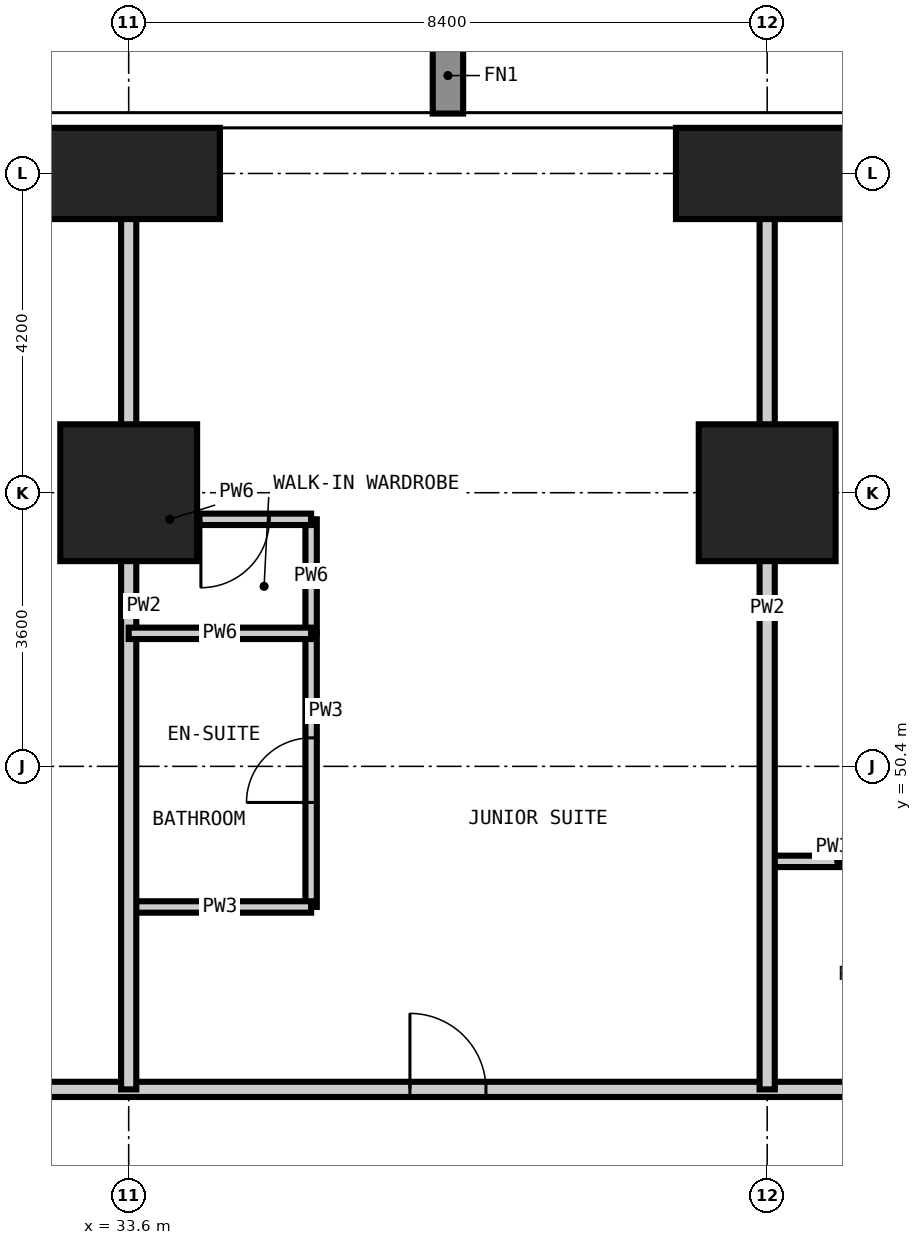
"""IFC4 building model, lengths in metres.
Left out: names, types, materials, properties, quantities, classifications, styles, units other than length and angle.
Written with IfcOpenShell. Run it as: python <this file> out.ifc"""

import sys

from ifc_helpers import new_model, si_unit, direction, frame, frame_2d, origin, origin_2d, place, context, subcontext, project, spatial, rectangle, extrude, element, fill, save


model = new_model("IFC4")
c1 = context("Model", 3, precision=1e-05, world=origin(), true_north=direction((0.0, 1.0)))
c2 = subcontext(c1, "Body", "Model", "MODEL_VIEW")
j1 = project(units=[si_unit("LENGTHUNIT", "METRE"), si_unit("PLANEANGLEUNIT", "RADIAN")], contexts=[c1])
p1 = place(None, origin())
s1 = spatial("IfcSite", under=j1, at=p1, CompositionType="ELEMENT")
p2 = place(p1, origin())
s2 = spatial("IfcBuilding", under=s1, at=p2, CompositionType="ELEMENT")
p3 = place(p2, frame((0.0, 0.0, 55.8)))
s3 = spatial("IfcBuildingStorey", under=s2, at=p3, CompositionType="ELEMENT", Elevation=55.8)
p4 = place(p3, frame((33.6, 54.0, -0.35), z_axis=(0.0, 0.0, 1.0), x_axis=(1.0, 0.0, 0.0)))
e1 = element("IfcColumn", 1, at=p4, inside=s3, PredefinedType="COLUMN", context=c2, shape_type="SweptSolid", body=[
    extrude(rectangle(XDim=1.8, YDim=1.8, at=origin_2d()), origin(), (0.0, 0.0, 1.0), 3.6),
])
p5 = place(p3, frame((33.6, 58.2, -0.35), z_axis=(0.0, 0.0, 1.0), x_axis=(1.0, 0.0, 0.0)))
e2 = element("IfcColumn", 2, at=p5, inside=s3, PredefinedType="COLUMN", context=c2, shape_type="SweptSolid", body=[
    extrude(rectangle(XDim=2.4, YDim=1.2, at=origin_2d()), origin(), (0.0, 0.0, 1.0), 3.6),
])
p6 = place(p3, frame((42.0, 54.0, -0.35), z_axis=(0.0, 0.0, 1.0), x_axis=(1.0, 0.0, 0.0)))
e3 = element("IfcColumn", 3, at=p6, inside=s3, PredefinedType="COLUMN", context=c2, shape_type="SweptSolid", body=[
    extrude(rectangle(XDim=1.8, YDim=1.8, at=origin_2d()), origin(), (0.0, 0.0, 1.0), 3.6),
])
p7 = place(p3, frame((42.0, 58.2, -0.35), z_axis=(0.0, 0.0, 1.0), x_axis=(1.0, 0.0, 0.0)))
e4 = element("IfcColumn", 4, at=p7, inside=s3, PredefinedType="COLUMN", context=c2, shape_type="SweptSolid", body=[
    extrude(rectangle(XDim=2.4, YDim=1.2, at=origin_2d()), origin(), (0.0, 0.0, 1.0), 3.6),
])
p8 = place(p3, frame((36.0, 48.55, 0.0), z_axis=(0.0, 0.0, 1.0), x_axis=(0.0, 1.0, 0.0)))
e5 = element("IfcWall", 5, at=p8, inside=s3, PredefinedType="PARTITIONING", context=c2, shape_type="SweptSolid", body=[
    extrude(rectangle(XDim=3.6, YDim=0.15, at=frame_2d((1.8, 0.0))), origin(), (0.0, 0.0, 1.0), 3.25),
])
p9 = place(p8, frame((1.375, 0.0, 0.0)))
e6 = element("IfcOpeningElement", 6, at=p9, cuts=e5, PredefinedType="OPENING", context=c2, shape_type="SweptSolid", body=[
    extrude(rectangle(XDim=0.85, YDim=2.1, at=frame_2d((0.425, 1.05))), frame((0.0, 0.085, 0.0), z_axis=(0.0, -1.0, 0.0), x_axis=(1.0, 0.0, 0.0)), (0.0, 0.0, 1.0), 0.17),
])
p10 = place(p3, frame((33.6, 48.55, 0.0), z_axis=(0.0, 0.0, 1.0), x_axis=(1.0, 0.0, 0.0)))
e7 = element("IfcWall", 7, at=p10, inside=s3, PredefinedType="PARTITIONING", context=c2, shape_type="SweptSolid", body=[
    extrude(rectangle(XDim=2.4, YDim=0.15, at=frame_2d((1.2, 0.0))), origin(), (0.0, 0.0, 1.0), 3.25),
])
p11 = place(p3, frame((42.0, 49.15, 0.0), z_axis=(0.0, 0.0, 1.0), x_axis=(1.0, 0.0, 0.0)))
e8 = element("IfcWall", 8, at=p11, inside=s3, PredefinedType="PARTITIONING", context=c2, shape_type="SweptSolid", body=[
    extrude(rectangle(XDim=3.55, YDim=0.15, at=frame_2d((1.775, 0.0))), origin(), (0.0, 0.0, 1.0), 3.25),
])
p12 = place(p11, frame((1.35, 0.0, 0.0)))
e9 = element("IfcOpeningElement", 9, at=p12, cuts=e8, PredefinedType="OPENING", context=c2, shape_type="SweptSolid", body=[
    extrude(rectangle(XDim=0.85, YDim=2.1, at=frame_2d((0.425, 1.05))), frame((0.0, 0.085, 0.0), z_axis=(0.0, -1.0, 0.0), x_axis=(1.0, 0.0, 0.0)), (0.0, 0.0, 1.0), 0.17),
])
p13 = place(p3, frame((13.85, 46.15, 0.0), z_axis=(0.0, 0.0, 1.0), x_axis=(1.0, 0.0, 0.0)))
e10 = element("IfcWall", 10, at=p13, inside=s3, PredefinedType="PARTITIONING", context=c2, shape_type="SweptSolid", body=[
    extrude(rectangle(XDim=31.7, YDim=0.2, at=frame_2d((15.85, 0.0))), origin(), (0.0, 0.0, 1.0), 3.25),
])
p14 = place(p13, frame((6.65, 0.0, 0.0)))
e11 = element("IfcOpeningElement", 11, at=p14, cuts=e10, PredefinedType="OPENING", context=c2, shape_type="SweptSolid", body=[
    extrude(rectangle(XDim=1.0, YDim=2.2, at=frame_2d((0.5, 1.1))), frame((0.0, 0.11, 0.0), z_axis=(0.0, -1.0, 0.0), x_axis=(1.0, 0.0, 0.0)), (0.0, 0.0, 1.0), 0.22),
])
p15 = place(p13, frame((15.05, 0.0, 0.0)))
e12 = element("IfcOpeningElement", 12, at=p15, cuts=e10, PredefinedType="OPENING", context=c2, shape_type="SweptSolid", body=[
    extrude(rectangle(XDim=1.0, YDim=2.2, at=frame_2d((0.5, 1.1))), frame((0.0, 0.11, 0.0), z_axis=(0.0, -1.0, 0.0), x_axis=(1.0, 0.0, 0.0)), (0.0, 0.0, 1.0), 0.22),
])
p16 = place(p13, frame((23.45, 0.0, 0.0)))
e13 = element("IfcOpeningElement", 13, at=p16, cuts=e10, PredefinedType="OPENING", context=c2, shape_type="SweptSolid", body=[
    extrude(rectangle(XDim=1.0, YDim=2.2, at=frame_2d((0.5, 1.1))), frame((0.0, 0.11, 0.0), z_axis=(0.0, -1.0, 0.0), x_axis=(1.0, 0.0, 0.0)), (0.0, 0.0, 1.0), 0.22),
])
for number, where, z_axis, x_axis in (
    (14, (33.6, 46.15, 0.0), (0.0, 0.0, 1.0), (0.0, 1.0, 0.0)),
    (15, (42.0, 46.15, 0.0), (0.0, 0.0, 1.0), (0.0, 1.0, 0.0)),
):
    element("IfcWall", number, at=place(p3, frame(where, z_axis=z_axis, x_axis=x_axis)), inside=s3, PredefinedType="PARTITIONING", context=c2, shape_type="SweptSolid", body=[
        extrude(rectangle(XDim=12.658, YDim=0.2, at=frame_2d((6.329, 0.0))), origin(), (0.0, 0.0, 1.0), 3.25),
    ])
p17 = place(p3, frame((36.0, 52.15, 0.0), z_axis=(0.0, 0.0, 1.0), x_axis=(0.0, 1.0, 0.0)))
e16 = element("IfcWall", 16, at=p17, inside=s3, PredefinedType="PARTITIONING", context=c2, shape_type="SweptSolid", body=[
    extrude(rectangle(XDim=1.5, YDim=0.15, at=frame_2d((0.75, 0.0))), origin(), (0.0, 0.0, 1.0), 3.25),
])
p18 = place(p3, frame((33.6, 52.15, 0.0), z_axis=(0.0, 0.0, 1.0), x_axis=(1.0, 0.0, 0.0)))
e17 = element("IfcWall", 17, at=p18, inside=s3, PredefinedType="PARTITIONING", context=c2, shape_type="SweptSolid", body=[
    extrude(rectangle(XDim=2.4, YDim=0.15, at=frame_2d((1.2, 0.0))), origin(), (0.0, 0.0, 1.0), 3.25),
])
p19 = place(p3, frame((33.6, 53.65, 0.0), z_axis=(0.0, 0.0, 1.0), x_axis=(1.0, 0.0, 0.0)))
e18 = element("IfcWall", 18, at=p19, inside=s3, PredefinedType="PARTITIONING", context=c2, shape_type="SweptSolid", body=[
    extrude(rectangle(XDim=2.4, YDim=0.15, at=frame_2d((1.2, 0.0))), origin(), (0.0, 0.0, 1.0), 3.25),
])
p20 = place(p19, frame((0.95, 0.0, 0.0)))
e19 = element("IfcOpeningElement", 19, at=p20, cuts=e18, PredefinedType="OPENING", context=c2, shape_type="SweptSolid", body=[
    extrude(rectangle(XDim=0.9, YDim=2.1, at=frame_2d((0.45, 1.05))), frame((0.0, 0.085, 0.0), z_axis=(0.0, -1.0, 0.0), x_axis=(1.0, 0.0, 0.0)), (0.0, 0.0, 1.0), 0.17),
])
p21 = place(p16, origin())
e20 = element("IfcDoor", 20, at=p21, inside=s3, OperationType="SINGLE_SWING_LEFT", PredefinedType="DOOR", context=c2, shape_type="SweptSolid", body=[
    extrude(rectangle(XDim=1.0, YDim=2.2, at=frame_2d((0.5, 1.1))), frame((0.0, 0.025, 0.0), z_axis=(0.0, -1.0, 0.0), x_axis=(1.0, 0.0, 0.0)), (0.0, 0.0, 1.0), 0.05),
])
fill(e13, e20)
p22 = place(p9, origin())
e21 = element("IfcDoor", 21, at=p22, inside=s3, OperationType="SINGLE_SWING_LEFT", PredefinedType="DOOR", context=c2, shape_type="SweptSolid", body=[
    extrude(rectangle(XDim=0.85, YDim=2.1, at=frame_2d((0.425, 1.05))), frame((0.0, 0.025, 0.0), z_axis=(0.0, -1.0, 0.0), x_axis=(1.0, 0.0, 0.0)), (0.0, 0.0, 1.0), 0.05),
])
fill(e6, e21)
p23 = place(p20, frame((0.9, 0.0, 0.0), z_axis=(0.0, 0.0, 1.0), x_axis=(-1.0, 0.0, 0.0)))
e22 = element("IfcDoor", 22, at=p23, inside=s3, OperationType="SINGLE_SWING_RIGHT", PredefinedType="DOOR", context=c2, shape_type="SweptSolid", body=[
    extrude(rectangle(XDim=0.9, YDim=2.1, at=frame_2d((0.45, 1.05))), frame((0.0, 0.025, 0.0), z_axis=(0.0, -1.0, 0.0), x_axis=(1.0, 0.0, 0.0)), (0.0, 0.0, 1.0), 0.05),
])
fill(e19, e22)
save(model, sys.argv[1])
